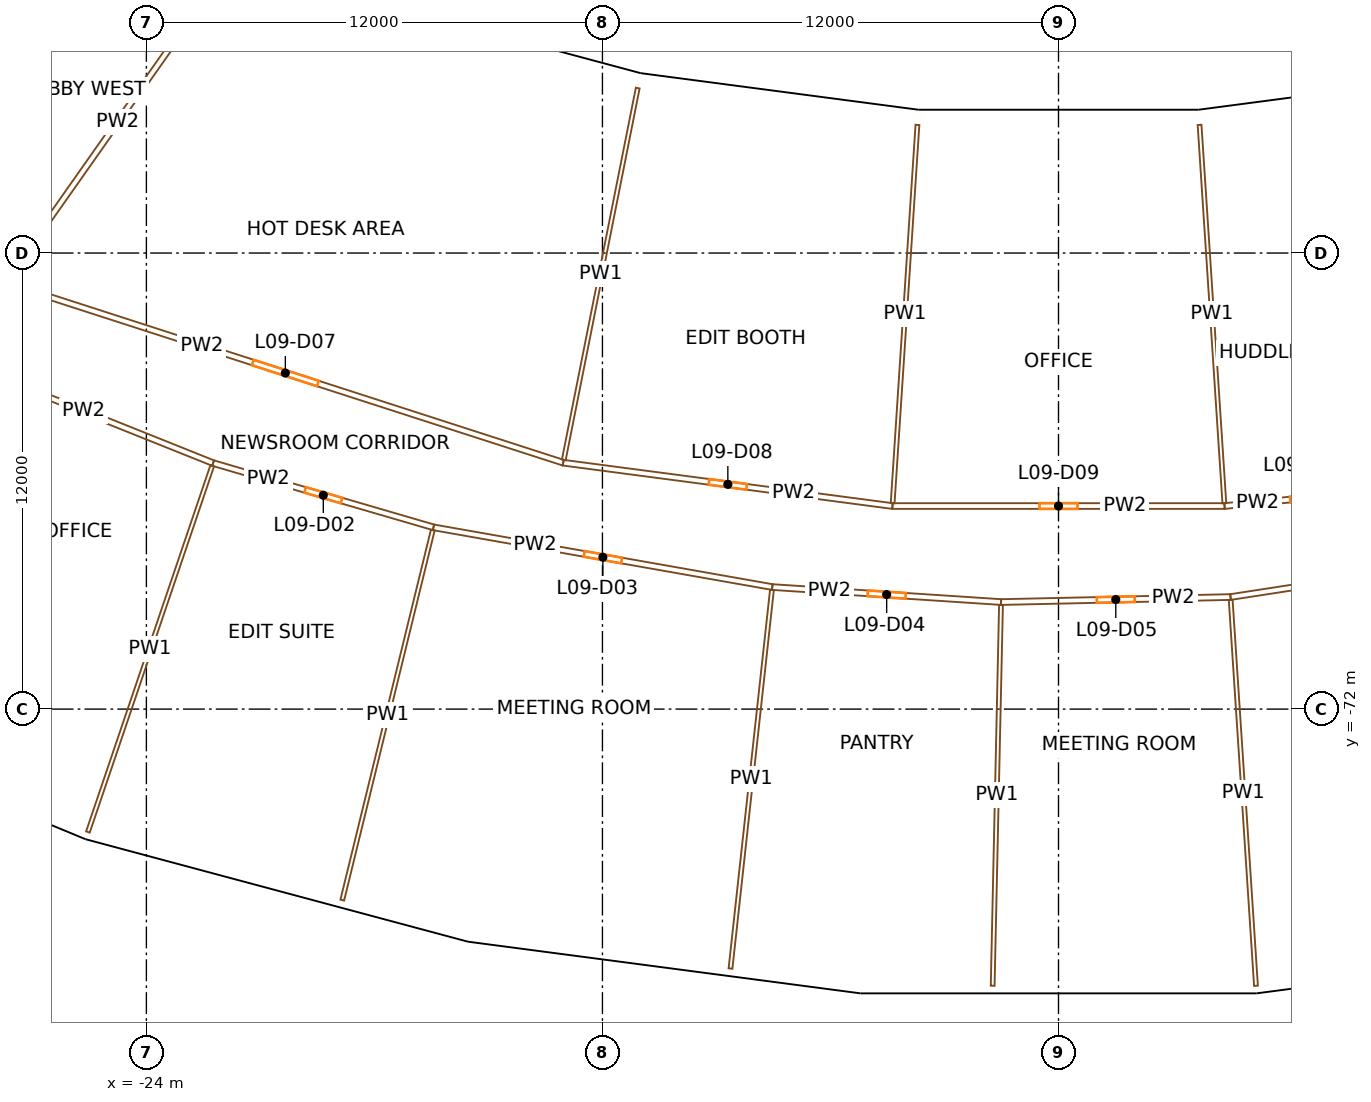
"""IFC4 building model, lengths in metres.
Left out: names, types, materials, properties, quantities, classifications, styles, units other than length and angle.
Written with IfcOpenShell. Run it as: python <this file> out.ifc"""

import sys

from ifc_helpers import new_model, si_unit, direction, frame, frame_2d, origin, origin_2d, place, context, subcontext, project, spatial, rectangle, extrude, element, fill, save


model = new_model("IFC4")
c1 = context("Model", 3, precision=1e-05, world=origin(), true_north=direction((0.0, 1.0)))
c2 = subcontext(c1, "Body", "Model", "MODEL_VIEW")
j1 = project(units=[si_unit("LENGTHUNIT", "METRE"), si_unit("PLANEANGLEUNIT", "RADIAN")], contexts=[c1])
p1 = place(None, origin())
s1 = spatial("IfcSite", under=j1, at=p1, CompositionType="ELEMENT")
p2 = place(p1, origin())
s2 = spatial("IfcBuilding", under=s1, at=p2, CompositionType="ELEMENT")
p3 = place(p2, frame((0.0, 0.0, 51.9)))
s3 = spatial("IfcBuildingStorey", under=s2, at=p3, CompositionType="ELEMENT", Elevation=51.9)
for number, where, z_axis, x_axis in (
    (1, (-18.724, -55.159, 0.0), (0.0, 0.0, 1.0), (0.947, -0.321, 0.0)),
    (2, (-24.992, -73.624, 0.0), (0.0, 0.0, 1.0), (0.947, -0.321, 0.0)),
    (3, (-11.364, -57.131, 0.0), (0.0, 0.0, 1.0), (0.981, -0.195, 0.0)),
    (4, (-15.168, -76.256, 0.0), (0.0, 0.0, 1.0), (0.981, -0.195, 0.0)),
    (5, (-3.81, -58.125, 0.0), (0.0, 0.0, 1.0), (0.998, -0.065, 0.0)),
    (6, (-5.085, -77.583, 0.0), (0.0, 0.0, 1.0), (0.998, -0.065, 0.0)),
    (7, (3.81, -58.125, 0.0), (0.0, 0.0, 1.0), (0.998, 0.065, 0.0)),
    (8, (5.085, -77.583, 0.0), (0.0, 0.0, 1.0), (0.998, 0.065, 0.0)),
):
    element("IfcColumn", number, at=place(p3, frame(where, z_axis=z_axis, x_axis=x_axis)), inside=s3, PredefinedType="COLUMN", context=c2, shape_type="SweptSolid", body=[
        extrude(rectangle(XDim=1.3, YDim=1.7, at=origin_2d()), origin(), (0.0, 0.0, 1.0), 3.8),
    ])
p4 = place(p3, frame((-11.008, -55.47, 0.0), z_axis=(0.0, 0.0, 1.0), x_axis=(-0.965924637935, 0.25882348006, 0.0)))
e9 = element("IfcWall", 9, at=p4, inside=s3, PredefinedType="SOLIDWALL", context=c2, shape_type="SweptSolid", body=[
    extrude(rectangle(XDim=7.447, YDim=0.4, at=frame_2d((3.724, 0.0))), origin(), (0.0, 0.0, 1.0), 2.7),
])
p5 = place(p4, frame((4.266, 0.0, 0.9)))
e10 = element("IfcOpeningElement", 10, at=p5, cuts=e9, PredefinedType="OPENING", context=c2, shape_type="SweptSolid", body=[
    extrude(rectangle(XDim=2.6, YDim=1.65, at=frame_2d((1.3, 0.825))), frame((0.0, 0.21, 0.0), z_axis=(0.0, -1.0, 0.0), x_axis=(1.0, 0.0, 0.0)), (0.0, 0.0, 1.0), 0.42),
])
p6 = place(p4, frame((0.581, 0.0, 0.9)))
e11 = element("IfcOpeningElement", 11, at=p6, cuts=e9, PredefinedType="OPENING", context=c2, shape_type="SweptSolid", body=[
    extrude(rectangle(XDim=2.6, YDim=1.65, at=frame_2d((1.3, 0.825))), frame((0.0, 0.21, 0.0), z_axis=(0.0, -1.0, 0.0), x_axis=(1.0, 0.0, 0.0)), (0.0, 0.0, 1.0), 0.42),
])
p7 = place(p3, frame((-3.749, -56.423, 0.0), z_axis=(0.0, 0.0, 1.0), x_axis=(-0.99144746031, 0.130506449818, 0.0)))
e12 = element("IfcWall", 12, at=p7, inside=s3, PredefinedType="SOLIDWALL", context=c2, shape_type="SweptSolid", body=[
    extrude(rectangle(XDim=7.296, YDim=0.4, at=frame_2d((3.648, 0.0))), origin(), (0.0, 0.0, 1.0), 2.7),
])
p8 = place(p7, frame((4.191, 0.0, 0.9)))
e13 = element("IfcOpeningElement", 13, at=p8, cuts=e12, PredefinedType="OPENING", context=c2, shape_type="SweptSolid", body=[
    extrude(rectangle(XDim=2.6, YDim=1.65, at=frame_2d((1.3, 0.825))), frame((0.0, 0.21, 0.0), z_axis=(0.0, -1.0, 0.0), x_axis=(1.0, 0.0, 0.0)), (0.0, 0.0, 1.0), 0.42),
])
p9 = place(p7, frame((0.505, 0.0, 0.9)))
e14 = element("IfcOpeningElement", 14, at=p9, cuts=e12, PredefinedType="OPENING", context=c2, shape_type="SweptSolid", body=[
    extrude(rectangle(XDim=2.6, YDim=1.65, at=frame_2d((1.3, 0.825))), frame((0.0, 0.21, 0.0), z_axis=(0.0, -1.0, 0.0), x_axis=(1.0, 0.0, 0.0)), (0.0, 0.0, 1.0), 0.42),
])
p10 = place(p3, frame((3.724, -56.429, 0.0), z_axis=(0.0, 0.0, 1.0), x_axis=(-1.0, 0.0, 0.0)))
e15 = element("IfcWall", 15, at=p10, inside=s3, PredefinedType="SOLIDWALL", context=c2, shape_type="SweptSolid", body=[
    extrude(rectangle(XDim=7.447, YDim=0.4, at=frame_2d((3.724, 0.0))), origin(), (0.0, 0.0, 1.0), 2.7),
])
p11 = place(p10, frame((4.266, 0.0, 0.9)))
e16 = element("IfcOpeningElement", 16, at=p11, cuts=e15, PredefinedType="OPENING", context=c2, shape_type="SweptSolid", body=[
    extrude(rectangle(XDim=2.6, YDim=1.65, at=frame_2d((1.3, 0.825))), frame((0.0, 0.21, 0.0), z_axis=(0.0, -1.0, 0.0), x_axis=(1.0, 0.0, 0.0)), (0.0, 0.0, 1.0), 0.42),
])
p12 = place(p10, frame((0.581, 0.0, 0.9)))
e17 = element("IfcOpeningElement", 17, at=p12, cuts=e15, PredefinedType="OPENING", context=c2, shape_type="SweptSolid", body=[
    extrude(rectangle(XDim=2.6, YDim=1.65, at=frame_2d((1.3, 0.825))), frame((0.0, 0.21, 0.0), z_axis=(0.0, -1.0, 0.0), x_axis=(1.0, 0.0, 0.0)), (0.0, 0.0, 1.0), 0.42),
])
p13 = place(p3, frame((10.982, -55.47, 0.0), z_axis=(0.0, 0.0, 1.0), x_axis=(-0.99144746031, -0.130506449818, 0.0)))
e18 = element("IfcWall", 18, at=p13, inside=s3, PredefinedType="SOLIDWALL", context=c2, shape_type="SweptSolid", body=[
    extrude(rectangle(XDim=7.296, YDim=0.4, at=frame_2d((3.648, 0.0))), origin(), (0.0, 0.0, 1.0), 2.7),
])
p14 = place(p13, frame((4.191, 0.0, 0.9)))
e19 = element("IfcOpeningElement", 19, at=p14, cuts=e18, PredefinedType="OPENING", context=c2, shape_type="SweptSolid", body=[
    extrude(rectangle(XDim=2.6, YDim=1.65, at=frame_2d((1.3, 0.825))), frame((0.0, 0.21, 0.0), z_axis=(0.0, -1.0, 0.0), x_axis=(1.0, 0.0, 0.0)), (0.0, 0.0, 1.0), 0.42),
])
p15 = place(p13, frame((0.505, 0.0, 0.9)))
e20 = element("IfcOpeningElement", 20, at=p15, cuts=e18, PredefinedType="OPENING", context=c2, shape_type="SweptSolid", body=[
    extrude(rectangle(XDim=2.6, YDim=1.65, at=frame_2d((1.3, 0.825))), frame((0.0, 0.21, 0.0), z_axis=(0.0, -1.0, 0.0), x_axis=(1.0, 0.0, 0.0)), (0.0, 0.0, 1.0), 0.42),
])
p16 = place(p3, frame((-29.061, -62.798, 0.0), z_axis=(0.0, 0.0, 1.0), x_axis=(0.928339065762, -0.371734554462, 0.0)))
e21 = element("IfcWall", 21, at=p16, inside=s3, PredefinedType="PARTITIONING", context=c2, shape_type="SweptSolid", body=[
    extrude(rectangle(XDim=7.344, YDim=0.15, at=frame_2d((3.672, 0.0))), origin(), (0.0, 0.0, 1.0), 2.4),
])
p17 = place(p3, frame((-27.656, -60.797, 0.0), z_axis=(0.0, 0.0, 1.0), x_axis=(0.951666530015, -0.307133221338, 0.0)))
e22 = element("IfcWall", 22, at=p17, inside=s3, PredefinedType="PARTITIONING", context=c2, shape_type="SweptSolid", body=[
    extrude(rectangle(XDim=15.366, YDim=0.15, at=frame_2d((7.683, 0.0))), origin(), (0.0, 0.0, 1.0), 2.4),
])
p18 = place(p17, frame((6.783, 0.0, 0.0)))
e23 = element("IfcOpeningElement", 23, at=p18, cuts=e22, PredefinedType="OPENING", context=c2, shape_type="SweptSolid", body=[
    extrude(rectangle(XDim=1.8, YDim=2.1, at=frame_2d((0.9, 1.05))), frame((0.0, 0.085, 0.0), z_axis=(0.0, -1.0, 0.0), x_axis=(1.0, 0.0, 0.0)), (0.0, 0.0, 1.0), 0.17),
])
p19 = place(p3, frame((-25.538, -75.234, 0.0), z_axis=(0.0, 0.0, 1.0), x_axis=(0.32142736677, 0.946934236308, 0.0)))
e24 = element("IfcWall", 24, at=p19, inside=s3, PredefinedType="PARTITIONING", context=c2, shape_type="SweptSolid", body=[
    extrude(rectangle(XDim=10.175, YDim=0.1, at=frame_2d((5.087, 0.0))), origin(), (0.0, 0.0, 1.0), 2.4),
])
p20 = place(p3, frame((-16.446, -67.217, 0.0), z_axis=(0.0, 0.0, 1.0), x_axis=(-0.960056580345, 0.279805937279, 0.0)))
e25 = element("IfcWall", 25, at=p20, inside=s3, PredefinedType="PARTITIONING", context=c2, shape_type="SweptSolid", body=[
    extrude(rectangle(XDim=6.039, YDim=0.15, at=frame_2d((3.02, 0.0))), origin(), (0.0, 0.0, 1.0), 2.4),
])
p21 = place(p20, frame((2.52, 0.0, 0.0)))
e26 = element("IfcOpeningElement", 26, at=p21, cuts=e25, PredefinedType="OPENING", context=c2, shape_type="SweptSolid", body=[
    extrude(rectangle(XDim=1.0, YDim=2.1, at=frame_2d((0.5, 1.05))), frame((0.0, 0.085, 0.0), z_axis=(0.0, -1.0, 0.0), x_axis=(1.0, 0.0, 0.0)), (0.0, 0.0, 1.0), 0.17),
])
p22 = place(p3, frame((-21.748, -52.276, 0.0), z_axis=(0.0, 0.0, 1.0), x_axis=(-0.575419434668, -0.817858468322, 0.0)))
e27 = element("IfcWall", 27, at=p22, inside=s3, PredefinedType="PARTITIONING", context=c2, shape_type="SweptSolid", body=[
    extrude(rectangle(XDim=10.465, YDim=0.15, at=frame_2d((5.232, 0.0))), origin(), (0.0, 0.0, 1.0), 2.4),
])
p23 = place(p3, frame((-18.846, -77.026, 0.0), z_axis=(0.0, 0.0, 1.0), x_axis=(0.237655344985, 0.971349544191, 0.0)))
e28 = element("IfcWall", 28, at=p23, inside=s3, PredefinedType="PARTITIONING", context=c2, shape_type="SweptSolid", body=[
    extrude(rectangle(XDim=10.023, YDim=0.1, at=frame_2d((5.012, 0.0))), origin(), (0.0, 0.0, 1.0), 2.4),
])
p24 = place(p3, frame((-7.532, -68.789, 0.0), z_axis=(0.0, 0.0, 1.0), x_axis=(-0.984813412134, 0.173616080133, 0.0)))
e29 = element("IfcWall", 29, at=p24, inside=s3, PredefinedType="PARTITIONING", context=c2, shape_type="SweptSolid", body=[
    extrude(rectangle(XDim=9.052, YDim=0.15, at=frame_2d((4.526, 0.0))), origin(), (0.0, 0.0, 1.0), 2.4),
])
p25 = place(p24, frame((4.026, 0.0, 0.0)))
e30 = element("IfcOpeningElement", 30, at=p25, cuts=e29, PredefinedType="OPENING", context=c2, shape_type="SweptSolid", body=[
    extrude(rectangle(XDim=1.0, YDim=2.1, at=frame_2d((0.5, 1.05))), frame((0.0, 0.085, 0.0), z_axis=(0.0, -1.0, 0.0), x_axis=(1.0, 0.0, 0.0)), (0.0, 0.0, 1.0), 0.17),
])
p26 = place(p3, frame((-13.032, -65.516, 0.0), z_axis=(0.0, 0.0, 1.0), x_axis=(0.991443260322, -0.130538352841, 0.0)))
e31 = element("IfcWall", 31, at=p26, inside=s3, PredefinedType="PARTITIONING", context=c2, shape_type="SweptSolid", body=[
    extrude(rectangle(XDim=8.738, YDim=0.15, at=frame_2d((4.369, 0.0))), origin(), (0.0, 0.0, 1.0), 2.4),
])
p27 = place(p26, frame((3.869, 0.0, 0.0)))
e32 = element("IfcOpeningElement", 32, at=p27, cuts=e31, PredefinedType="OPENING", context=c2, shape_type="SweptSolid", body=[
    extrude(rectangle(XDim=1.0, YDim=2.1, at=frame_2d((0.5, 1.05))), frame((0.0, 0.085, 0.0), z_axis=(0.0, -1.0, 0.0), x_axis=(1.0, 0.0, 0.0)), (0.0, 0.0, 1.0), 0.17),
])
p28 = place(p3, frame((-11.071, -55.66, 0.0), z_axis=(0.0, 0.0, 1.0), x_axis=(-0.195094645032, -0.980784420492, 0.0)))
e33 = element("IfcWall", 33, at=p28, inside=s3, PredefinedType="PARTITIONING", context=c2, shape_type="SweptSolid", body=[
    extrude(rectangle(XDim=9.975, YDim=0.1, at=frame_2d((4.987, 0.0))), origin(), (0.0, 0.0, 1.0), 2.4),
])
p29 = place(p3, frame((-8.631, -78.827, 0.0), z_axis=(0.0, 0.0, 1.0), x_axis=(0.108851448718, 0.994058027538, 0.0)))
e34 = element("IfcWall", 34, at=p29, inside=s3, PredefinedType="PARTITIONING", context=c2, shape_type="SweptSolid", body=[
    extrude(rectangle(XDim=10.023, YDim=0.1, at=frame_2d((5.012, 0.0))), origin(), (0.0, 0.0, 1.0), 2.4),
])
p30 = place(p3, frame((-1.511, -69.184, 0.0), z_axis=(0.0, 0.0, 1.0), x_axis=(-0.997856905736, 0.065433903101, 0.0)))
e35 = element("IfcWall", 35, at=p30, inside=s3, PredefinedType="PARTITIONING", context=c2, shape_type="SweptSolid", body=[
    extrude(rectangle(XDim=6.033, YDim=0.15, at=frame_2d((3.017, 0.0))), origin(), (0.0, 0.0, 1.0), 2.4),
])
p31 = place(p30, frame((2.517, 0.0, 0.0)))
e36 = element("IfcOpeningElement", 36, at=p31, cuts=e35, PredefinedType="OPENING", context=c2, shape_type="SweptSolid", body=[
    extrude(rectangle(XDim=1.0, YDim=2.1, at=frame_2d((0.5, 1.05))), frame((0.0, 0.085, 0.0), z_axis=(0.0, -1.0, 0.0), x_axis=(1.0, 0.0, 0.0)), (0.0, 0.0, 1.0), 0.17),
])
p32 = place(p3, frame((-4.369, -66.657, 0.0), z_axis=(0.0, 0.0, 1.0), x_axis=(1.0, 0.0, 0.0)))
e37 = element("IfcWall", 37, at=p32, inside=s3, PredefinedType="PARTITIONING", context=c2, shape_type="SweptSolid", body=[
    extrude(rectangle(XDim=8.738, YDim=0.15, at=frame_2d((4.369, 0.0))), origin(), (0.0, 0.0, 1.0), 2.4),
])
p33 = place(p32, frame((3.869, 0.0, 0.0)))
e38 = element("IfcOpeningElement", 38, at=p33, cuts=e37, PredefinedType="OPENING", context=c2, shape_type="SweptSolid", body=[
    extrude(rectangle(XDim=1.0, YDim=2.1, at=frame_2d((0.5, 1.05))), frame((0.0, 0.085, 0.0), z_axis=(0.0, -1.0, 0.0), x_axis=(1.0, 0.0, 0.0)), (0.0, 0.0, 1.0), 0.17),
])
p34 = place(p3, frame((-3.712, -56.628, 0.0), z_axis=(0.0, 0.0, 1.0), x_axis=(-0.06539808502, -0.997859253841, 0.0)))
e39 = element("IfcWall", 39, at=p34, inside=s3, PredefinedType="PARTITIONING", context=c2, shape_type="SweptSolid", body=[
    extrude(rectangle(XDim=9.975, YDim=0.1, at=frame_2d((4.987, 0.0))), origin(), (0.0, 0.0, 1.0), 2.4),
])
p35 = place(p3, frame((-1.732, -79.28, 0.0), z_axis=(0.0, 0.0, 1.0), x_axis=(0.021848313685, 0.999761297105, 0.0)))
e40 = element("IfcWall", 40, at=p35, inside=s3, PredefinedType="PARTITIONING", context=c2, shape_type="SweptSolid", body=[
    extrude(rectangle(XDim=10.023, YDim=0.1, at=frame_2d((5.012, 0.0))), origin(), (0.0, 0.0, 1.0), 2.4),
])
p36 = place(p3, frame((4.526, -69.052, 0.0), z_axis=(0.0, 0.0, 1.0), x_axis=(-0.999761664283, -0.021831505468, 0.0)))
e41 = element("IfcWall", 41, at=p36, inside=s3, PredefinedType="PARTITIONING", context=c2, shape_type="SweptSolid", body=[
    extrude(rectangle(XDim=6.039, YDim=0.15, at=frame_2d((3.02, 0.0))), origin(), (0.0, 0.0, 1.0), 2.4),
])
p37 = place(p36, frame((2.52, 0.0, 0.0)))
e42 = element("IfcOpeningElement", 42, at=p37, cuts=e41, PredefinedType="OPENING", context=c2, shape_type="SweptSolid", body=[
    extrude(rectangle(XDim=1.0, YDim=2.1, at=frame_2d((0.5, 1.05))), frame((0.0, 0.085, 0.0), z_axis=(0.0, -1.0, 0.0), x_axis=(1.0, 0.0, 0.0)), (0.0, 0.0, 1.0), 0.17),
])
p38 = place(p3, frame((3.712, -56.628, 0.0), z_axis=(0.0, 0.0, 1.0), x_axis=(0.06539808502, -0.997859253841, 0.0)))
e43 = element("IfcWall", 43, at=p38, inside=s3, PredefinedType="PARTITIONING", context=c2, shape_type="SweptSolid", body=[
    extrude(rectangle(XDim=9.975, YDim=0.1, at=frame_2d((4.987, 0.0))), origin(), (0.0, 0.0, 1.0), 2.4),
])
p39 = place(p3, frame((4.369, -66.657, 0.0), z_axis=(0.0, 0.0, 1.0), x_axis=(0.995184826457, 0.098016127192, 0.0)))
e44 = element("IfcWall", 44, at=p39, inside=s3, PredefinedType="PARTITIONING", context=c2, shape_type="SweptSolid", body=[
    extrude(rectangle(XDim=4.371, YDim=0.15, at=frame_2d((2.186, 0.0))), origin(), (0.0, 0.0, 1.0), 2.4),
])
p40 = place(p39, frame((1.736, 0.0, 0.0)))
e45 = element("IfcOpeningElement", 45, at=p40, cuts=e44, PredefinedType="OPENING", context=c2, shape_type="SweptSolid", body=[
    extrude(rectangle(XDim=0.9, YDim=2.1, at=frame_2d((0.45, 1.05))), frame((0.0, 0.085, 0.0), z_axis=(0.0, -1.0, 0.0), x_axis=(1.0, 0.0, 0.0)), (0.0, 0.0, 1.0), 0.17),
])
p41 = place(p3, frame((4.526, -69.052, 0.0), z_axis=(0.0, 0.0, 1.0), x_axis=(0.988363732991, 0.152108945522, 0.0)))
e46 = element("IfcWall", 46, at=p41, inside=s3, PredefinedType="PARTITIONING", context=c2, shape_type="SweptSolid", body=[
    extrude(rectangle(XDim=12.051, YDim=0.15, at=frame_2d((6.025, 0.0))), origin(), (0.0, 0.0, 1.0), 2.4),
])
p42 = place(p3, frame((5.196, -79.28, 0.0), z_axis=(0.0, 0.0, 1.0), x_axis=(-0.065408959123, 0.99785854111, 0.0)))
e47 = element("IfcWall", 47, at=p42, inside=s3, PredefinedType="PARTITIONING", context=c2, shape_type="SweptSolid", body=[
    extrude(rectangle(XDim=10.175, YDim=0.1, at=frame_2d((5.087, 0.0))), origin(), (0.0, 0.0, 1.0), 2.4),
])
p43 = place(p6, origin())
e48 = element("IfcWindow", 48, at=p43, inside=s3, PartitioningType="SINGLE_PANEL", PredefinedType="WINDOW", context=c2, shape_type="SweptSolid", body=[
    extrude(rectangle(XDim=2.6, YDim=1.65, at=frame_2d((1.3, 0.825))), frame((0.0, 0.03, 0.0), z_axis=(0.0, -1.0, 0.0), x_axis=(1.0, 0.0, 0.0)), (0.0, 0.0, 1.0), 0.06),
])
fill(e11, e48)
p44 = place(p8, origin())
e49 = element("IfcWindow", 49, at=p44, inside=s3, PartitioningType="SINGLE_PANEL", PredefinedType="WINDOW", context=c2, shape_type="SweptSolid", body=[
    extrude(rectangle(XDim=2.6, YDim=1.65, at=frame_2d((1.3, 0.825))), frame((0.0, 0.03, 0.0), z_axis=(0.0, -1.0, 0.0), x_axis=(1.0, 0.0, 0.0)), (0.0, 0.0, 1.0), 0.06),
])
fill(e13, e49)
p45 = place(p9, origin())
e50 = element("IfcWindow", 50, at=p45, inside=s3, PartitioningType="SINGLE_PANEL", PredefinedType="WINDOW", context=c2, shape_type="SweptSolid", body=[
    extrude(rectangle(XDim=2.6, YDim=1.65, at=frame_2d((1.3, 0.825))), frame((0.0, 0.03, 0.0), z_axis=(0.0, -1.0, 0.0), x_axis=(1.0, 0.0, 0.0)), (0.0, 0.0, 1.0), 0.06),
])
fill(e14, e50)
p46 = place(p11, origin())
e51 = element("IfcWindow", 51, at=p46, inside=s3, PartitioningType="SINGLE_PANEL", PredefinedType="WINDOW", context=c2, shape_type="SweptSolid", body=[
    extrude(rectangle(XDim=2.6, YDim=1.65, at=frame_2d((1.3, 0.825))), frame((0.0, 0.03, 0.0), z_axis=(0.0, -1.0, 0.0), x_axis=(1.0, 0.0, 0.0)), (0.0, 0.0, 1.0), 0.06),
])
fill(e16, e51)
p47 = place(p12, origin())
e52 = element("IfcWindow", 52, at=p47, inside=s3, PartitioningType="SINGLE_PANEL", PredefinedType="WINDOW", context=c2, shape_type="SweptSolid", body=[
    extrude(rectangle(XDim=2.6, YDim=1.65, at=frame_2d((1.3, 0.825))), frame((0.0, 0.03, 0.0), z_axis=(0.0, -1.0, 0.0), x_axis=(1.0, 0.0, 0.0)), (0.0, 0.0, 1.0), 0.06),
])
fill(e17, e52)
p48 = place(p14, origin())
e53 = element("IfcWindow", 53, at=p48, inside=s3, PartitioningType="SINGLE_PANEL", PredefinedType="WINDOW", context=c2, shape_type="SweptSolid", body=[
    extrude(rectangle(XDim=2.6, YDim=1.65, at=frame_2d((1.3, 0.825))), frame((0.0, 0.03, 0.0), z_axis=(0.0, -1.0, 0.0), x_axis=(1.0, 0.0, 0.0)), (0.0, 0.0, 1.0), 0.06),
])
fill(e19, e53)
p49 = place(p21, origin())
e54 = element("IfcDoor", 54, at=p49, inside=s3, OperationType="SINGLE_SWING_RIGHT", PredefinedType="DOOR", context=c2, shape_type="SweptSolid", body=[
    extrude(rectangle(XDim=1.0, YDim=2.1, at=frame_2d((0.5, 1.05))), frame((0.0, 0.025, 0.0), z_axis=(0.0, -1.0, 0.0), x_axis=(1.0, 0.0, 0.0)), (0.0, 0.0, 1.0), 0.05),
])
fill(e26, e54)
p50 = place(p25, origin())
e55 = element("IfcDoor", 55, at=p50, inside=s3, OperationType="SINGLE_SWING_RIGHT", PredefinedType="DOOR", context=c2, shape_type="SweptSolid", body=[
    extrude(rectangle(XDim=1.0, YDim=2.1, at=frame_2d((0.5, 1.05))), frame((0.0, 0.025, 0.0), z_axis=(0.0, -1.0, 0.0), x_axis=(1.0, 0.0, 0.0)), (0.0, 0.0, 1.0), 0.05),
])
fill(e30, e55)
p51 = place(p31, origin())
e56 = element("IfcDoor", 56, at=p51, inside=s3, OperationType="SINGLE_SWING_RIGHT", PredefinedType="DOOR", context=c2, shape_type="SweptSolid", body=[
    extrude(rectangle(XDim=1.0, YDim=2.1, at=frame_2d((0.5, 1.05))), frame((0.0, 0.025, 0.0), z_axis=(0.0, -1.0, 0.0), x_axis=(1.0, 0.0, 0.0)), (0.0, 0.0, 1.0), 0.05),
])
fill(e36, e56)
p52 = place(p37, origin())
e57 = element("IfcDoor", 57, at=p52, inside=s3, OperationType="SINGLE_SWING_RIGHT", PredefinedType="DOOR", context=c2, shape_type="SweptSolid", body=[
    extrude(rectangle(XDim=1.0, YDim=2.1, at=frame_2d((0.5, 1.05))), frame((0.0, 0.025, 0.0), z_axis=(0.0, -1.0, 0.0), x_axis=(1.0, 0.0, 0.0)), (0.0, 0.0, 1.0), 0.05),
])
fill(e42, e57)
p53 = place(p18, origin())
e58 = element("IfcDoor", 58, at=p53, inside=s3, OperationType="DOUBLE_DOOR_SINGLE_SWING", PredefinedType="DOOR", context=c2, shape_type="SweptSolid", body=[
    extrude(rectangle(XDim=1.8, YDim=2.1, at=frame_2d((0.9, 1.05))), frame((0.0, 0.025, 0.0), z_axis=(0.0, -1.0, 0.0), x_axis=(1.0, 0.0, 0.0)), (0.0, 0.0, 1.0), 0.05),
])
fill(e23, e58)
p54 = place(p27, origin())
e59 = element("IfcDoor", 59, at=p54, inside=s3, OperationType="SINGLE_SWING_RIGHT", PredefinedType="DOOR", context=c2, shape_type="SweptSolid", body=[
    extrude(rectangle(XDim=1.0, YDim=2.1, at=frame_2d((0.5, 1.05))), frame((0.0, 0.025, 0.0), z_axis=(0.0, -1.0, 0.0), x_axis=(1.0, 0.0, 0.0)), (0.0, 0.0, 1.0), 0.05),
])
fill(e32, e59)
p55 = place(p33, origin())
e60 = element("IfcDoor", 60, at=p55, inside=s3, OperationType="SINGLE_SWING_RIGHT", PredefinedType="DOOR", context=c2, shape_type="SweptSolid", body=[
    extrude(rectangle(XDim=1.0, YDim=2.1, at=frame_2d((0.5, 1.05))), frame((0.0, 0.025, 0.0), z_axis=(0.0, -1.0, 0.0), x_axis=(1.0, 0.0, 0.0)), (0.0, 0.0, 1.0), 0.05),
])
fill(e38, e60)
p56 = place(p40, origin())
e61 = element("IfcDoor", 61, at=p56, inside=s3, OperationType="SINGLE_SWING_RIGHT", PredefinedType="DOOR", context=c2, shape_type="SweptSolid", body=[
    extrude(rectangle(XDim=0.9, YDim=2.1, at=frame_2d((0.45, 1.05))), frame((0.0, 0.025, 0.0), z_axis=(0.0, -1.0, 0.0), x_axis=(1.0, 0.0, 0.0)), (0.0, 0.0, 1.0), 0.05),
])
fill(e45, e61)
save(model, sys.argv[1])
